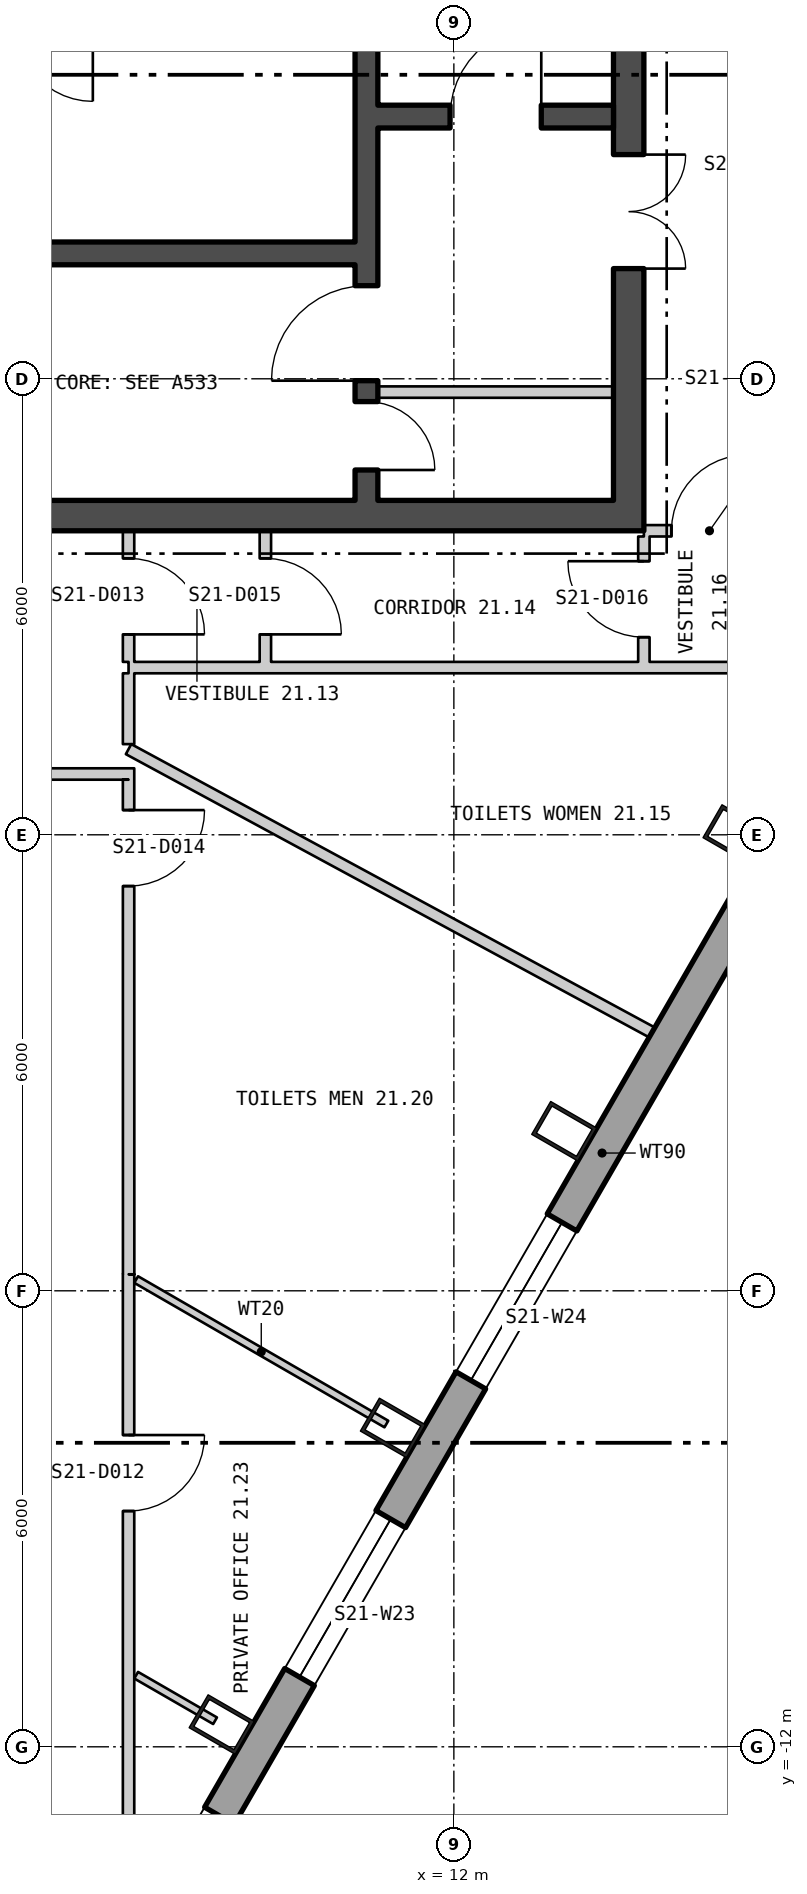
"""IFC4 building model, lengths in metres.
Left out: names, types, materials, properties, quantities, classifications, styles, units other than length and angle.
Written with IfcOpenShell. Run it as: python <this file> out.ifc"""

import sys

from ifc_helpers import new_model, si_unit, direction, frame, frame_2d, origin, origin_2d, place, context, subcontext, project, spatial, polyline, rectangle, hollow_rectangle, outline, extrude, element, fill, save


model = new_model("IFC4")
c1 = context("Model", 3, precision=1e-05, world=origin(), true_north=direction((0.0, 1.0)))
c2 = subcontext(c1, "Body", "Model", "MODEL_VIEW")
j1 = project(units=[si_unit("LENGTHUNIT", "METRE"), si_unit("PLANEANGLEUNIT", "RADIAN")], contexts=[c1])
p1 = place(None, origin())
s1 = spatial("IfcSite", under=j1, at=p1, CompositionType="ELEMENT")
p2 = place(p1, origin())
s2 = spatial("IfcBuilding", under=s1, at=p2, CompositionType="ELEMENT")
p3 = place(p2, frame((0.0, 0.0, 280.5)))
s3 = spatial("IfcBuildingStorey", under=s2, at=p3, CompositionType="ELEMENT", Elevation=280.5)
for number, where, z_axis, x_axis in (
    (1, (8.945, -11.707, 0.0), (0.0, 0.0, 1.0), (0.5, 0.866, 0.0)),
    (2, (11.198, -7.804, 0.0), (0.0, 0.0, 1.0), (0.5, 0.866, 0.0)),
    (3, (13.452, -3.9, 0.0), (0.0, 0.0, 1.0), (0.5, 0.866, 0.0)),
    (4, (15.706, 0.004, 0.0), (0.0, 0.0, 1.0), (0.5, 0.866, 0.0)),
):
    element("IfcColumn", number, at=place(p3, frame(where, z_axis=z_axis, x_axis=x_axis)), inside=s3, PredefinedType="COLUMN", context=c2, shape_type="SweptSolid", body=[
        extrude(hollow_rectangle(XDim=0.5, YDim=0.7, WallThickness=0.045, at=origin_2d()), origin(), (0.0, 0.0, 1.0), 3.9),
    ])
p4 = place(p3, frame((2.515, -23.993, -0.18), z_axis=(0.0, 0.0, 1.0), x_axis=(0.500000711659, 0.866024992908, 0.0)))
e5 = element("IfcWall", 5, at=p4, inside=s3, PredefinedType="SOLIDWALL", context=c2, shape_type="SweptSolid", body=[
    extrude(outline(polyline([(-0.13, -0.225), (45.87, -0.225), (45.61, 0.225), (0.13, 0.225), (-0.13, -0.225)])), origin(), (0.0, 0.0, 1.0), 3.68),
])
p5 = place(p4, frame((1.424, 0.0, 1.08)))
e6 = element("IfcOpeningElement", 6, at=p5, cuts=e5, PredefinedType="OPENING", context=c2, shape_type="SweptSolid", body=[
    extrude(rectangle(XDim=2.4, YDim=2.0, at=frame_2d((1.2, 1.0))), frame((0.0, 0.235, 0.0), z_axis=(0.0, -1.0, 0.0), x_axis=(1.0, 0.0, 0.0)), (0.0, 0.0, 1.0), 0.47),
])
p6 = place(p4, frame((5.893, 0.0, 1.08)))
e7 = element("IfcOpeningElement", 7, at=p6, cuts=e5, PredefinedType="OPENING", context=c2, shape_type="SweptSolid", body=[
    extrude(rectangle(XDim=2.4, YDim=2.0, at=frame_2d((1.2, 1.0))), frame((0.0, 0.235, 0.0), z_axis=(0.0, -1.0, 0.0), x_axis=(1.0, 0.0, 0.0)), (0.0, 0.0, 1.0), 0.47),
])
p7 = place(p4, frame((10.401, 0.0, 1.08)))
e8 = element("IfcOpeningElement", 8, at=p7, cuts=e5, PredefinedType="OPENING", context=c2, shape_type="SweptSolid", body=[
    extrude(rectangle(XDim=2.4, YDim=2.0, at=frame_2d((1.2, 1.0))), frame((0.0, 0.235, 0.0), z_axis=(0.0, -1.0, 0.0), x_axis=(1.0, 0.0, 0.0)), (0.0, 0.0, 1.0), 0.47),
])
p8 = place(p4, frame((14.909, 0.0, 1.08)))
e9 = element("IfcOpeningElement", 9, at=p8, cuts=e5, PredefinedType="OPENING", context=c2, shape_type="SweptSolid", body=[
    extrude(rectangle(XDim=2.4, YDim=2.0, at=frame_2d((1.2, 1.0))), frame((0.0, 0.235, 0.0), z_axis=(0.0, -1.0, 0.0), x_axis=(1.0, 0.0, 0.0)), (0.0, 0.0, 1.0), 0.47),
])
p9 = place(p4, frame((19.416, 0.0, 1.08)))
e10 = element("IfcOpeningElement", 10, at=p9, cuts=e5, PredefinedType="OPENING", context=c2, shape_type="SweptSolid", body=[
    extrude(rectangle(XDim=2.4, YDim=2.0, at=frame_2d((1.2, 1.0))), frame((0.0, 0.235, 0.0), z_axis=(0.0, -1.0, 0.0), x_axis=(1.0, 0.0, 0.0)), (0.0, 0.0, 1.0), 0.47),
])
p10 = place(p4, frame((28.431, 0.0, 1.08)))
e11 = element("IfcOpeningElement", 11, at=p10, cuts=e5, PredefinedType="OPENING", context=c2, shape_type="SweptSolid", body=[
    extrude(rectangle(XDim=2.4, YDim=2.0, at=frame_2d((1.2, 1.0))), frame((0.0, 0.235, 0.0), z_axis=(0.0, -1.0, 0.0), x_axis=(1.0, 0.0, 0.0)), (0.0, 0.0, 1.0), 0.47),
])
p11 = place(p4, frame((37.447, 0.0, 1.08)))
e12 = element("IfcOpeningElement", 12, at=p11, cuts=e5, PredefinedType="OPENING", context=c2, shape_type="SweptSolid", body=[
    extrude(rectangle(XDim=2.4, YDim=2.0, at=frame_2d((1.2, 1.0))), frame((0.0, 0.235, 0.0), z_axis=(0.0, -1.0, 0.0), x_axis=(1.0, 0.0, 0.0)), (0.0, 0.0, 1.0), 0.47),
])
p12 = place(p4, frame((41.916, 0.0, 1.08)))
e13 = element("IfcOpeningElement", 13, at=p12, cuts=e5, PredefinedType="OPENING", context=c2, shape_type="SweptSolid", body=[
    extrude(rectangle(XDim=2.4, YDim=2.0, at=frame_2d((1.2, 1.0))), frame((0.0, 0.235, 0.0), z_axis=(0.0, -1.0, 0.0), x_axis=(1.0, 0.0, 0.0)), (0.0, 0.0, 1.0), 0.47),
])
p13 = place(p3, frame((-14.5, 4.2, 0.0), z_axis=(0.0, 0.0, 1.0), x_axis=(1.0, 0.0, 0.0)))
e14 = element("IfcWall", 14, at=p13, inside=s3, PredefinedType="SHEAR", context=c2, shape_type="SweptSolid", body=[
    extrude(rectangle(XDim=29.0, YDim=0.4, at=frame_2d((14.5, 0.0))), origin(), (0.0, 0.0, 1.0), 3.7),
])
p14 = place(p13, frame((9.0, 0.0, 0.0)))
e15 = element("IfcOpeningElement", 15, at=p14, cuts=e14, PredefinedType="OPENING", context=c2, shape_type="SweptSolid", body=[
    extrude(rectangle(XDim=1.8, YDim=2.4, at=frame_2d((0.9, 1.2))), frame((0.0, 0.21, 0.0), z_axis=(0.0, -1.0, 0.0), x_axis=(1.0, 0.0, 0.0)), (0.0, 0.0, 1.0), 0.42),
])
p15 = place(p13, frame((19.0, 0.0, 0.0)))
e16 = element("IfcOpeningElement", 16, at=p15, cuts=e14, PredefinedType="OPENING", context=c2, shape_type="SweptSolid", body=[
    extrude(rectangle(XDim=1.8, YDim=2.4, at=frame_2d((0.9, 1.2))), frame((0.0, 0.21, 0.0), z_axis=(0.0, -1.0, 0.0), x_axis=(1.0, 0.0, 0.0)), (0.0, 0.0, 1.0), 0.42),
])
p16 = place(p3, frame((14.3, 4.4, 0.0), z_axis=(0.0, 0.0, 1.0), x_axis=(0.0, 1.0, 0.0)))
e17 = element("IfcWall", 17, at=p16, inside=s3, PredefinedType="SHEAR", context=c2, shape_type="SweptSolid", body=[
    extrude(rectangle(XDim=13.2, YDim=0.4, at=frame_2d((6.6, 0.0))), origin(), (0.0, 0.0, 1.0), 3.7),
])
p17 = place(p16, frame((3.05, 0.0, 0.0)))
e18 = element("IfcOpeningElement", 18, at=p17, cuts=e17, PredefinedType="OPENING", context=c2, shape_type="SweptSolid", body=[
    extrude(rectangle(XDim=1.5, YDim=2.1, at=frame_2d((0.75, 1.05))), frame((0.0, 0.21, 0.0), z_axis=(0.0, -1.0, 0.0), x_axis=(1.0, 0.0, 0.0)), (0.0, 0.0, 1.0), 0.42),
])
p18 = place(p3, frame((10.85, 4.4, 0.0), z_axis=(0.0, 0.0, 1.0), x_axis=(0.0, 1.0, 0.0)))
e19 = element("IfcWall", 19, at=p18, inside=s3, PredefinedType="SHEAR", context=c2, shape_type="SweptSolid", body=[
    extrude(rectangle(XDim=13.2, YDim=0.3, at=frame_2d((6.6, 0.0))), origin(), (0.0, 0.0, 1.0), 3.7),
])
p19 = place(p18, frame((1.575, 0.0, 0.0)))
e20 = element("IfcOpeningElement", 20, at=p19, cuts=e19, PredefinedType="OPENING", context=c2, shape_type="SweptSolid", body=[
    extrude(rectangle(XDim=1.25, YDim=2.1, at=frame_2d((0.625, 1.05))), frame((0.0, 0.16, 0.0), z_axis=(0.0, -1.0, 0.0), x_axis=(1.0, 0.0, 0.0)), (0.0, 0.0, 1.0), 0.32),
])
p20 = place(p18, frame((0.4, 0.0, 0.0)))
e21 = element("IfcOpeningElement", 21, at=p20, cuts=e19, PredefinedType="OPENING", context=c2, shape_type="SweptSolid", body=[
    extrude(rectangle(XDim=0.9, YDim=2.1, at=frame_2d((0.45, 1.05))), frame((0.0, 0.16, 0.0), z_axis=(0.0, -1.0, 0.0), x_axis=(1.0, 0.0, 0.0)), (0.0, 0.0, 1.0), 0.32),
])
p21 = place(p3, frame((11.0, 9.45, 0.0), z_axis=(0.0, 0.0, 1.0), x_axis=(1.0, 0.0, 0.0)))
e22 = element("IfcWall", 22, at=p21, inside=s3, PredefinedType="SHEAR", context=c2, shape_type="SweptSolid", body=[
    extrude(rectangle(XDim=3.1, YDim=0.3, at=frame_2d((1.55, 0.0))), origin(), (0.0, 0.0, 1.0), 3.7),
])
p22 = place(p21, frame((0.95, 0.0, 0.0)))
e23 = element("IfcOpeningElement", 23, at=p22, cuts=e22, PredefinedType="OPENING", context=c2, shape_type="SweptSolid", body=[
    extrude(rectangle(XDim=1.2, YDim=2.1, at=frame_2d((0.6, 1.05))), frame((0.0, 0.16, 0.0), z_axis=(0.0, -1.0, 0.0), x_axis=(1.0, 0.0, 0.0)), (0.0, 0.0, 1.0), 0.32),
])
p23 = place(p3, frame((2.6, 7.65, 0.0), z_axis=(0.0, 0.0, 1.0), x_axis=(1.0, 0.0, 0.0)))
e24 = element("IfcWall", 24, at=p23, inside=s3, PredefinedType="SHEAR", context=c2, shape_type="SweptSolid", body=[
    extrude(rectangle(XDim=8.1, YDim=0.3, at=frame_2d((4.05, 0.0))), origin(), (0.0, 0.0, 1.0), 3.7),
])
p24 = place(p3, frame((11.0, 5.825, 0.0), z_axis=(0.0, 0.0, 1.0), x_axis=(1.0, 0.0, 0.0)))
e25 = element("IfcWall", 25, at=p24, inside=s3, PredefinedType="PARTITIONING", context=c2, shape_type="SweptSolid", body=[
    extrude(rectangle(XDim=3.1, YDim=0.15, at=frame_2d((1.55, 0.0))), origin(), (0.0, 0.0, 1.0), 3.7),
])
p25 = place(p3, frame((-7.72, 0.8, 0.0), z_axis=(0.0, 0.0, 1.0), x_axis=(1.0, 0.0, 0.0)))
e26 = element("IfcWall", 26, at=p25, inside=s3, PredefinedType="PARTITIONING", context=c2, shape_type="SweptSolid", body=[
    extrude(rectangle(XDim=15.515, YDim=0.15, at=frame_2d((7.758, 0.0))), origin(), (0.0, 0.0, 1.0), 3.7),
])
p26 = place(p25, frame((1.206, 0.0, 0.0)))
e27 = element("IfcOpeningElement", 27, at=p26, cuts=e26, PredefinedType="OPENING", context=c2, shape_type="SweptSolid", body=[
    extrude(rectangle(XDim=1.0, YDim=2.1, at=frame_2d((0.5, 1.05))), frame((0.0, 0.085, 0.0), z_axis=(0.0, -1.0, 0.0), x_axis=(1.0, 0.0, 0.0)), (0.0, 0.0, 1.0), 0.17),
])
p27 = place(p25, frame((13.234, 0.0, 0.0)))
e28 = element("IfcOpeningElement", 28, at=p27, cuts=e26, PredefinedType="OPENING", context=c2, shape_type="SweptSolid", body=[
    extrude(rectangle(XDim=1.0, YDim=2.1, at=frame_2d((0.5, 1.05))), frame((0.0, 0.085, 0.0), z_axis=(0.0, -1.0, 0.0), x_axis=(1.0, 0.0, 0.0)), (0.0, 0.0, 1.0), 0.17),
])
p28 = place(p3, frame((7.72, -13.675, 0.0), z_axis=(0.0, 0.0, 1.0), x_axis=(0.0, 1.0, 0.0)))
e29 = element("IfcWall", 29, at=p28, inside=s3, PredefinedType="PARTITIONING", context=c2, shape_type="SweptSolid", body=[
    extrude(rectangle(XDim=7.892, YDim=0.15, at=frame_2d((3.946, 0.0))), origin(), (0.0, 0.0, 1.0), 3.7),
])
p29 = place(p28, frame((4.777, 0.0, 0.0)))
e30 = element("IfcOpeningElement", 30, at=p29, cuts=e29, PredefinedType="OPENING", context=c2, shape_type="SweptSolid", body=[
    extrude(rectangle(XDim=1.0, YDim=2.1, at=frame_2d((0.5, 1.05))), frame((0.0, 0.085, 0.0), z_axis=(0.0, -1.0, 0.0), x_axis=(1.0, 0.0, 0.0)), (0.0, 0.0, 1.0), 0.17),
])
p30 = place(p3, frame((7.72, 1.127, 0.0), z_axis=(0.0, 0.0, 1.0), x_axis=(0.879447920674, -0.475995120586, 0.0)))
e31 = element("IfcWall", 31, at=p30, inside=s3, PredefinedType="PARTITIONING", context=c2, shape_type="SweptSolid", body=[
    extrude(rectangle(XDim=7.83, YDim=0.15, at=frame_2d((3.915, 0.0))), origin(), (0.0, 0.0, 1.0), 3.7),
])
p31 = place(p3, frame((7.72, 1.193, 0.0), z_axis=(0.0, 0.0, 1.0), x_axis=(0.0, 1.0, 0.0)))
e32 = element("IfcWall", 32, at=p31, inside=s3, PredefinedType="PARTITIONING", context=c2, shape_type="SweptSolid", body=[
    extrude(rectangle(XDim=0.932, YDim=0.15, at=frame_2d((0.466, 0.0))), origin(), (0.0, 0.0, 1.0), 3.7),
])
p32 = place(p3, frame((7.72, 2.2, 0.0), z_axis=(0.0, 0.0, 1.0), x_axis=(1.0, 0.0, 0.0)))
e33 = element("IfcWall", 33, at=p32, inside=s3, PredefinedType="PARTITIONING", context=c2, shape_type="SweptSolid", body=[
    extrude(rectangle(XDim=8.505, YDim=0.15, at=frame_2d((4.253, 0.0))), origin(), (0.0, 0.0, 1.0), 3.7),
])
p33 = place(p3, frame((7.72, 2.275, 0.0), z_axis=(0.0, 0.0, 1.0), x_axis=(0.0, 1.0, 0.0)))
e34 = element("IfcWall", 34, at=p33, inside=s3, PredefinedType="PARTITIONING", context=c2, shape_type="SweptSolid", body=[
    extrude(rectangle(XDim=1.725, YDim=0.15, at=frame_2d((0.863, 0.0))), origin(), (0.0, 0.0, 1.0), 3.7),
])
p34 = place(p33, frame((0.362, 0.0, 0.0)))
e35 = element("IfcOpeningElement", 35, at=p34, cuts=e34, PredefinedType="OPENING", context=c2, shape_type="SweptSolid", body=[
    extrude(rectangle(XDim=1.0, YDim=2.1, at=frame_2d((0.5, 1.05))), frame((0.0, 0.085, 0.0), z_axis=(0.0, -1.0, 0.0), x_axis=(1.0, 0.0, 0.0)), (0.0, 0.0, 1.0), 0.17),
])
p35 = place(p3, frame((7.72, 0.725, 0.0), z_axis=(0.0, 0.0, 1.0), x_axis=(0.000153657036, -0.999999988195, 0.0)))
e36 = element("IfcWall", 36, at=p35, inside=s3, PredefinedType="PARTITIONING", context=c2, shape_type="SweptSolid", body=[
    extrude(rectangle(XDim=6.508, YDim=0.15, at=frame_2d((3.254, 0.0))), origin(), (0.0, 0.0, 1.0), 3.7),
])
p36 = place(p35, frame((0.4, 0.0, 0.0)))
e37 = element("IfcOpeningElement", 37, at=p36, cuts=e36, PredefinedType="OPENING", context=c2, shape_type="SweptSolid", body=[
    extrude(rectangle(XDim=1.0, YDim=2.1, at=frame_2d((0.5, 1.05))), frame((0.0, 0.085, 0.0), z_axis=(0.0, -1.0, 0.0), x_axis=(1.0, 0.0, 0.0)), (0.0, 0.0, 1.0), 0.17),
])
p37 = place(p3, frame((7.82, -5.852, 0.0), z_axis=(0.0, 0.0, 1.0), x_axis=(0.865984062371, -0.500071598593, 0.0)))
e38 = element("IfcWall", 38, at=p37, inside=s3, PredefinedType="PARTITIONING", context=c2, shape_type="SweptSolid", body=[
    extrude(rectangle(XDim=3.801, YDim=0.1, at=frame_2d((1.901, 0.0))), origin(), (0.0, 0.0, 1.0), 3.7),
])
p38 = place(p3, frame((7.82, -11.058, 0.0), z_axis=(0.0, 0.0, 1.0), x_axis=(0.866130014302, -0.499818765479, 0.0)))
e39 = element("IfcWall", 39, at=p38, inside=s3, PredefinedType="PARTITIONING", context=c2, shape_type="SweptSolid", body=[
    extrude(rectangle(XDim=1.198, YDim=0.1, at=frame_2d((0.599, 0.0))), origin(), (0.0, 0.0, 1.0), 3.7),
])
p39 = place(p3, frame((9.52, 2.275, 0.0), z_axis=(0.0, 0.0, 1.0), x_axis=(0.0, 1.0, 0.0)))
e40 = element("IfcWall", 40, at=p39, inside=s3, PredefinedType="PARTITIONING", context=c2, shape_type="SweptSolid", body=[
    extrude(rectangle(XDim=1.725, YDim=0.15, at=frame_2d((0.863, 0.0))), origin(), (0.0, 0.0, 1.0), 3.2),
])
p40 = place(p39, frame((0.362, 0.0, 0.0)))
e41 = element("IfcOpeningElement", 41, at=p40, cuts=e40, PredefinedType="OPENING", context=c2, shape_type="SweptSolid", body=[
    extrude(rectangle(XDim=1.0, YDim=2.1, at=frame_2d((0.5, 1.05))), frame((0.0, 0.085, 0.0), z_axis=(0.0, -1.0, 0.0), x_axis=(1.0, 0.0, 0.0)), (0.0, 0.0, 1.0), 0.17),
])
p41 = place(p3, frame((14.5, 2.275, 0.0), z_axis=(0.0, 0.0, 1.0), x_axis=(0.0, 1.0, 0.0)))
e42 = element("IfcWall", 42, at=p41, inside=s3, PredefinedType="PARTITIONING", context=c2, shape_type="SweptSolid", body=[
    extrude(rectangle(XDim=1.65, YDim=0.15, at=frame_2d((0.825, 0.0))), origin(), (0.0, 0.0, 1.0), 3.7),
])
p42 = place(p41, frame((0.325, 0.0, 0.0)))
e43 = element("IfcOpeningElement", 43, at=p42, cuts=e42, PredefinedType="OPENING", context=c2, shape_type="SweptSolid", body=[
    extrude(rectangle(XDim=1.0, YDim=2.1, at=frame_2d((0.5, 1.05))), frame((0.0, 0.085, 0.0), z_axis=(0.0, -1.0, 0.0), x_axis=(1.0, 0.0, 0.0)), (0.0, 0.0, 1.0), 0.17),
])
p43 = place(p3, frame((14.5, 4.0, 0.0), z_axis=(0.0, 0.0, 1.0), x_axis=(1.0, 0.0, 0.0)))
e44 = element("IfcWall", 44, at=p43, inside=s3, PredefinedType="PARTITIONING", context=c2, shape_type="SweptSolid", body=[
    extrude(rectangle(XDim=1.725, YDim=0.15, at=frame_2d((0.863, 0.0))), origin(), (0.0, 0.0, 1.0), 3.16),
])
p44 = place(p43, frame((0.363, 0.0, 0.0)))
e45 = element("IfcOpeningElement", 45, at=p44, cuts=e44, PredefinedType="OPENING", context=c2, shape_type="SweptSolid", body=[
    extrude(rectangle(XDim=1.0, YDim=2.1, at=frame_2d((0.5, 1.05))), frame((0.0, 0.085, 0.0), z_axis=(0.0, -1.0, 0.0), x_axis=(1.0, 0.0, 0.0)), (0.0, 0.0, 1.0), 0.17),
])
p45 = place(p7, origin())
e46 = element("IfcWindow", 46, at=p45, inside=s3, PartitioningType="SINGLE_PANEL", PredefinedType="WINDOW", context=c2, shape_type="SweptSolid", body=[
    extrude(rectangle(XDim=2.4, YDim=2.0, at=frame_2d((1.2, 1.0))), frame((0.0, 0.105, 0.0), z_axis=(0.0, -1.0, 0.0), x_axis=(1.0, 0.0, 0.0)), (0.0, 0.0, 1.0), 0.06),
])
fill(e8, e46)
p46 = place(p8, origin())
e47 = element("IfcWindow", 47, at=p46, inside=s3, PartitioningType="SINGLE_PANEL", PredefinedType="WINDOW", context=c2, shape_type="SweptSolid", body=[
    extrude(rectangle(XDim=2.4, YDim=2.0, at=frame_2d((1.2, 1.0))), frame((0.0, 0.105, 0.0), z_axis=(0.0, -1.0, 0.0), x_axis=(1.0, 0.0, 0.0)), (0.0, 0.0, 1.0), 0.06),
])
fill(e9, e47)
p47 = place(p9, origin())
e48 = element("IfcWindow", 48, at=p47, inside=s3, PartitioningType="SINGLE_PANEL", PredefinedType="WINDOW", context=c2, shape_type="SweptSolid", body=[
    extrude(rectangle(XDim=2.4, YDim=2.0, at=frame_2d((1.2, 1.0))), frame((0.0, 0.105, 0.0), z_axis=(0.0, -1.0, 0.0), x_axis=(1.0, 0.0, 0.0)), (0.0, 0.0, 1.0), 0.06),
])
fill(e10, e48)
p48 = place(p22, origin())
e49 = element("IfcDoor", 49, at=p48, inside=s3, OperationType="SINGLE_SWING_LEFT", PredefinedType="DOOR", context=c2, shape_type="SweptSolid", body=[
    extrude(rectangle(XDim=1.2, YDim=2.1, at=frame_2d((0.6, 1.05))), frame((0.0, 0.025, 0.0), z_axis=(0.0, -1.0, 0.0), x_axis=(1.0, 0.0, 0.0)), (0.0, 0.0, 1.0), 0.05),
])
fill(e23, e49)
p49 = place(p19, origin())
e50 = element("IfcDoor", 50, at=p49, inside=s3, OperationType="SINGLE_SWING_RIGHT", PredefinedType="DOOR", context=c2, shape_type="SweptSolid", body=[
    extrude(rectangle(XDim=1.25, YDim=2.1, at=frame_2d((0.625, 1.05))), frame((0.0, 0.025, 0.0), z_axis=(0.0, -1.0, 0.0), x_axis=(1.0, 0.0, 0.0)), (0.0, 0.0, 1.0), 0.05),
])
fill(e20, e50)
p50 = place(p17, origin())
e51 = element("IfcDoor", 51, at=p50, inside=s3, OperationType="DOUBLE_DOOR_SINGLE_SWING", PredefinedType="DOOR", context=c2, shape_type="SweptSolid", body=[
    extrude(rectangle(XDim=1.5, YDim=2.1, at=frame_2d((0.75, 1.05))), frame((0.0, 0.025, 0.0), z_axis=(0.0, -1.0, 0.0), x_axis=(1.0, 0.0, 0.0)), (0.0, 0.0, 1.0), 0.05),
])
fill(e18, e51)
p51 = place(p20, origin())
e52 = element("IfcDoor", 52, at=p51, inside=s3, OperationType="SINGLE_SWING_LEFT", PredefinedType="DOOR", context=c2, shape_type="SweptSolid", body=[
    extrude(rectangle(XDim=0.9, YDim=2.1, at=frame_2d((0.45, 1.05))), frame((0.0, 0.025, 0.0), z_axis=(0.0, -1.0, 0.0), x_axis=(1.0, 0.0, 0.0)), (0.0, 0.0, 1.0), 0.05),
])
fill(e21, e52)
p52 = place(p29, origin())
e53 = element("IfcDoor", 53, at=p52, inside=s3, OperationType="SINGLE_SWING_RIGHT", PredefinedType="DOOR", context=c2, shape_type="SweptSolid", body=[
    extrude(rectangle(XDim=1.0, YDim=2.1, at=frame_2d((0.5, 1.05))), frame((0.0, 0.025, 0.0), z_axis=(0.0, -1.0, 0.0), x_axis=(1.0, 0.0, 0.0)), (0.0, 0.0, 1.0), 0.05),
])
fill(e30, e53)
p53 = place(p34, origin())
e54 = element("IfcDoor", 54, at=p53, inside=s3, OperationType="SINGLE_SWING_LEFT", PredefinedType="DOOR", context=c2, shape_type="SweptSolid", body=[
    extrude(rectangle(XDim=1.0, YDim=2.1, at=frame_2d((0.5, 1.05))), frame((0.0, 0.025, 0.0), z_axis=(0.0, -1.0, 0.0), x_axis=(1.0, 0.0, 0.0)), (0.0, 0.0, 1.0), 0.05),
])
fill(e35, e54)
p54 = place(p36, origin())
e55 = element("IfcDoor", 55, at=p54, inside=s3, OperationType="SINGLE_SWING_RIGHT", PredefinedType="DOOR", context=c2, shape_type="SweptSolid", body=[
    extrude(rectangle(XDim=1.0, YDim=2.1, at=frame_2d((0.5, 1.05))), frame((0.0, 0.025, 0.0), z_axis=(0.0, -1.0, 0.0), x_axis=(1.0, 0.0, 0.0)), (0.0, 0.0, 1.0), 0.05),
])
fill(e37, e55)
p55 = place(p40, origin())
e56 = element("IfcDoor", 56, at=p55, inside=s3, OperationType="SINGLE_SWING_LEFT", PredefinedType="DOOR", context=c2, shape_type="SweptSolid", body=[
    extrude(rectangle(XDim=1.0, YDim=2.1, at=frame_2d((0.5, 1.05))), frame((0.0, 0.025, 0.0), z_axis=(0.0, -1.0, 0.0), x_axis=(1.0, 0.0, 0.0)), (0.0, 0.0, 1.0), 0.05),
])
fill(e41, e56)
p56 = place(p42, origin())
e57 = element("IfcDoor", 57, at=p56, inside=s3, OperationType="SINGLE_SWING_LEFT", PredefinedType="DOOR", context=c2, shape_type="SweptSolid", body=[
    extrude(rectangle(XDim=1.0, YDim=2.1, at=frame_2d((0.5, 1.05))), frame((0.0, 0.025, 0.0), z_axis=(0.0, -1.0, 0.0), x_axis=(1.0, 0.0, 0.0)), (0.0, 0.0, 1.0), 0.05),
])
fill(e43, e57)
p57 = place(p44, origin())
e58 = element("IfcDoor", 58, at=p57, inside=s3, OperationType="SINGLE_SWING_LEFT", PredefinedType="DOOR", context=c2, shape_type="SweptSolid", body=[
    extrude(rectangle(XDim=1.0, YDim=2.1, at=frame_2d((0.5, 1.05))), frame((0.0, 0.025, 0.0), z_axis=(0.0, -1.0, 0.0), x_axis=(1.0, 0.0, 0.0)), (0.0, 0.0, 1.0), 0.05),
])
fill(e45, e58)
save(model, sys.argv[1])
